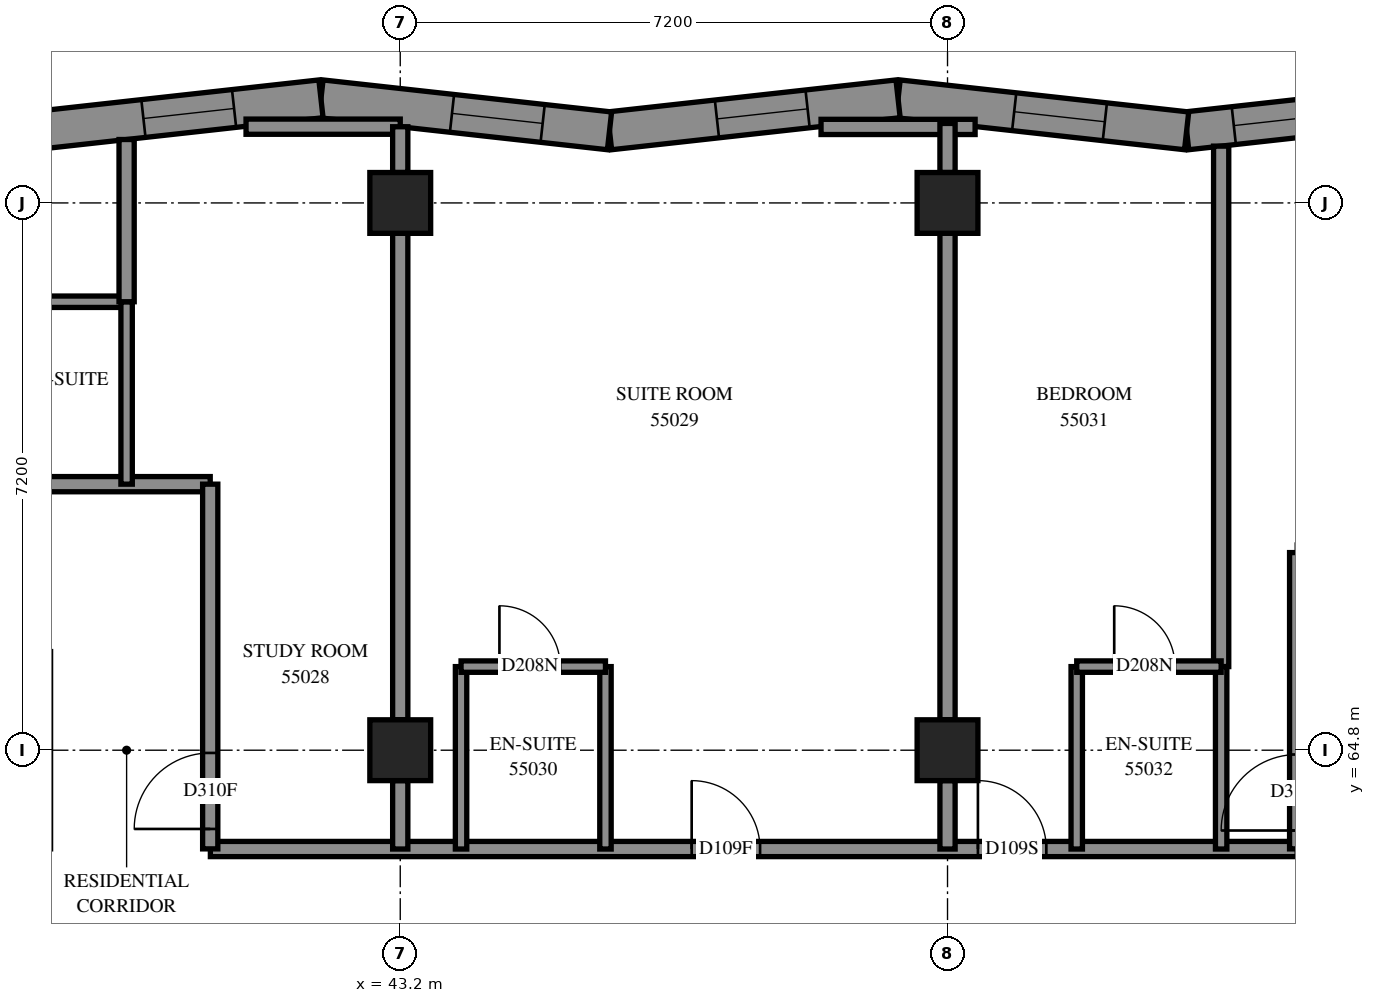
"""IFC4 building model, lengths in metres.
Left out: names, types, materials, properties, quantities, classifications, styles, units other than length and angle.
Written with IfcOpenShell. Run it as: python <this file> out.ifc"""

import sys

from ifc_helpers import new_model, si_unit, direction, frame, frame_2d, origin, origin_2d, place, context, subcontext, project, spatial, polyline, rectangle, outline, extrude, element, fill, save


model = new_model("IFC4")
c1 = context("Model", 3, precision=1e-05, world=origin(), true_north=direction((0.0, 1.0)))
c2 = subcontext(c1, "Body", "Model", "MODEL_VIEW")
j1 = project(units=[si_unit("LENGTHUNIT", "METRE"), si_unit("PLANEANGLEUNIT", "RADIAN")], contexts=[c1])
p1 = place(None, origin())
s1 = spatial("IfcSite", under=j1, at=p1, CompositionType="ELEMENT")
p2 = place(p1, origin())
s2 = spatial("IfcBuilding", under=s1, at=p2, CompositionType="ELEMENT")
p3 = place(p2, frame((0.0, 0.0, 203.2)))
s3 = spatial("IfcBuildingStorey", under=s2, at=p3, CompositionType="ELEMENT", Elevation=203.2)
for number, where, z_axis, x_axis in (
    (1, (43.2, 64.8, 0.0), (0.0, 0.0, 1.0), (1.0, 0.0, 0.0)),
    (2, (43.2, 72.0, 0.0), (0.0, 0.0, 1.0), (1.0, 0.0, 0.0)),
    (3, (50.4, 64.8, 0.0), (0.0, 0.0, 1.0), (1.0, 0.0, 0.0)),
    (4, (50.4, 72.0, 0.0), (0.0, 0.0, 1.0), (1.0, 0.0, 0.0)),
):
    element("IfcColumn", number, at=place(p3, frame(where, z_axis=z_axis, x_axis=x_axis)), inside=s3, PredefinedType="COLUMN", context=c2, shape_type="SweptSolid", body=[
        extrude(rectangle(XDim=0.8, YDim=0.8, at=origin_2d()), origin(), (0.0, 0.0, 1.0), 3.1),
    ])
p4 = place(p3, frame((57.342, 73.37, 0.0), z_axis=(0.0, 0.0, 1.0), x_axis=(-0.99390702, -0.1102217568, 0.0)))
e5 = element("IfcWall", 5, at=p4, inside=s3, PredefinedType="SOLIDWALL", context=c2, shape_type="SweptSolid", body=[
    extrude(outline(polyline([(-0.028, -0.25), (3.792, -0.25), (3.847, 0.25), (0.028, 0.25), (-0.028, -0.25)])), origin(), (0.0, 0.0, 1.0), 3.1),
])
p5 = place(p4, frame((0.395, 0.0, 0.45)))
e6 = element("IfcOpeningElement", 6, at=p5, cuts=e5, PredefinedType="OPENING", context=c2, shape_type="SweptSolid", body=[
    extrude(rectangle(XDim=1.3, YDim=2.5, at=frame_2d((0.65, 1.25))), frame((0.0, 0.26, 0.0), z_axis=(0.0, -1.0, 0.0), x_axis=(1.0, 0.0, 0.0)), (0.0, 0.0, 1.0), 0.52),
])
p6 = place(p4, frame((1.895, 0.0, 0.45)))
e7 = element("IfcOpeningElement", 7, at=p6, cuts=e5, PredefinedType="OPENING", context=c2, shape_type="SweptSolid", body=[
    extrude(rectangle(XDim=1.3, YDim=2.5, at=frame_2d((0.65, 1.25))), frame((0.0, 0.26, 0.0), z_axis=(0.0, -1.0, 0.0), x_axis=(1.0, 0.0, 0.0)), (0.0, 0.0, 1.0), 0.52),
])
p7 = place(p3, frame((53.546, 72.948, 0.0), z_axis=(0.0, 0.0, 1.0), x_axis=(-0.99390702, 0.1102217568, 0.0)))
e8 = element("IfcWall", 8, at=p7, inside=s3, PredefinedType="SOLIDWALL", context=c2, shape_type="SweptSolid", body=[
    extrude(outline(polyline([(0.028, -0.25), (3.847, -0.25), (3.792, 0.25), (-0.028, 0.25), (0.028, -0.25)])), origin(), (0.0, 0.0, 1.0), 3.1),
])
p8 = place(p7, frame((1.083, 0.0, 0.45)))
e9 = element("IfcOpeningElement", 9, at=p8, cuts=e8, PredefinedType="OPENING", context=c2, shape_type="SweptSolid", body=[
    extrude(rectangle(XDim=1.2, YDim=2.5, at=frame_2d((0.6, 1.25))), frame((0.0, 0.26, 0.0), z_axis=(0.0, -1.0, 0.0), x_axis=(1.0, 0.0, 0.0)), (0.0, 0.0, 1.0), 0.52),
])
p9 = place(p3, frame((49.749, 73.37, 0.0), z_axis=(0.0, 0.0, 1.0), x_axis=(-0.99390702, -0.1102217568, 0.0)))
e10 = element("IfcWall", 10, at=p9, inside=s3, PredefinedType="SOLIDWALL", context=c2, shape_type="SweptSolid", body=[
    extrude(outline(polyline([(-0.028, -0.25), (3.792, -0.25), (3.847, 0.25), (0.028, 0.25), (-0.028, -0.25)])), origin(), (0.0, 0.0, 1.0), 3.1),
])
p10 = place(p9, frame((1.198, 0.0, 0.45)))
e11 = element("IfcOpeningElement", 11, at=p10, cuts=e10, PredefinedType="OPENING", context=c2, shape_type="SweptSolid", body=[
    extrude(rectangle(XDim=1.2, YDim=2.5, at=frame_2d((0.6, 1.25))), frame((0.0, 0.26, 0.0), z_axis=(0.0, -1.0, 0.0), x_axis=(1.0, 0.0, 0.0)), (0.0, 0.0, 1.0), 0.52),
])
p11 = place(p3, frame((45.953, 72.948, 0.0), z_axis=(0.0, 0.0, 1.0), x_axis=(-0.99390702, 0.1102217568, 0.0)))
e12 = element("IfcWall", 12, at=p11, inside=s3, PredefinedType="SOLIDWALL", context=c2, shape_type="SweptSolid", body=[
    extrude(outline(polyline([(0.028, -0.25), (3.847, -0.25), (3.792, 0.25), (-0.028, 0.25), (0.028, -0.25)])), origin(), (0.0, 0.0, 1.0), 3.1),
])
p12 = place(p11, frame((0.885, 0.0, 0.45)))
e13 = element("IfcOpeningElement", 13, at=p12, cuts=e12, PredefinedType="OPENING", context=c2, shape_type="SweptSolid", body=[
    extrude(rectangle(XDim=1.2, YDim=2.5, at=frame_2d((0.6, 1.25))), frame((0.0, 0.26, 0.0), z_axis=(0.0, -1.0, 0.0), x_axis=(1.0, 0.0, 0.0)), (0.0, 0.0, 1.0), 0.52),
])
p13 = place(p3, frame((42.157, 73.37, 0.0), z_axis=(0.0, 0.0, 1.0), x_axis=(-0.99390702, -0.1102217568, 0.0)))
e14 = element("IfcWall", 14, at=p13, inside=s3, PredefinedType="SOLIDWALL", context=c2, shape_type="SweptSolid", body=[
    extrude(outline(polyline([(-0.028, -0.25), (3.792, -0.25), (3.847, 0.25), (0.028, 0.25), (-0.028, -0.25)])), origin(), (0.0, 0.0, 1.0), 3.1),
])
p14 = place(p13, frame((1.15, 0.0, 0.45)))
e15 = element("IfcOpeningElement", 15, at=p14, cuts=e14, PredefinedType="OPENING", context=c2, shape_type="SweptSolid", body=[
    extrude(rectangle(XDim=1.2, YDim=2.5, at=frame_2d((0.6, 1.25))), frame((0.0, 0.26, 0.0), z_axis=(0.0, -1.0, 0.0), x_axis=(1.0, 0.0, 0.0)), (0.0, 0.0, 1.0), 0.52),
])
p15 = place(p3, frame((21.6, 68.3, 0.0), z_axis=(0.0, 0.0, 1.0), x_axis=(1.0, 0.0, 0.0)))
e16 = element("IfcWall", 16, at=p15, inside=s3, PredefinedType="PARTITIONING", context=c2, shape_type="SweptSolid", body=[
    extrude(rectangle(XDim=19.1, YDim=0.2, at=frame_2d((9.55, 0.0))), origin(), (0.0, 0.0, 1.0), 3.1),
])
p16 = place(p15, frame((2.3, 0.0, 0.0)))
e17 = element("IfcOpeningElement", 17, at=p16, cuts=e16, PredefinedType="OPENING", context=c2, shape_type="SweptSolid", body=[
    extrude(rectangle(XDim=0.9, YDim=2.1, at=frame_2d((0.45, 1.05))), frame((0.0, 0.11, 0.0), z_axis=(0.0, -1.0, 0.0), x_axis=(1.0, 0.0, 0.0)), (0.0, 0.0, 1.0), 0.22),
])
p17 = place(p15, frame((5.901, 0.0, 0.0)))
e18 = element("IfcOpeningElement", 18, at=p17, cuts=e16, PredefinedType="OPENING", context=c2, shape_type="SweptSolid", body=[
    extrude(rectangle(XDim=0.9, YDim=2.1, at=frame_2d((0.45, 1.05))), frame((0.0, 0.11, 0.0), z_axis=(0.0, -1.0, 0.0), x_axis=(1.0, 0.0, 0.0)), (0.0, 0.0, 1.0), 0.22),
])
p18 = place(p15, frame((13.139, 0.0, 0.0)))
e19 = element("IfcOpeningElement", 19, at=p18, cuts=e16, PredefinedType="OPENING", context=c2, shape_type="SweptSolid", body=[
    extrude(rectangle(XDim=0.9, YDim=2.1, at=frame_2d((0.45, 1.05))), frame((0.0, 0.11, 0.0), z_axis=(0.0, -1.0, 0.0), x_axis=(1.0, 0.0, 0.0)), (0.0, 0.0, 1.0), 0.22),
])
p19 = place(p3, frame((40.702, 63.5, 0.0), z_axis=(0.0, 0.0, 1.0), x_axis=(1.0, 0.0, 0.0)))
e20 = element("IfcWall", 20, at=p19, inside=s3, PredefinedType="PARTITIONING", context=c2, shape_type="SweptSolid", body=[
    extrude(rectangle(XDim=14.298, YDim=0.2, at=frame_2d((7.149, 0.0))), origin(), (0.0, 0.0, 1.0), 3.1),
])
p20 = place(p19, frame((6.332, 0.0, 0.0)))
e21 = element("IfcOpeningElement", 21, at=p20, cuts=e20, PredefinedType="OPENING", context=c2, shape_type="SweptSolid", body=[
    extrude(rectangle(XDim=0.9, YDim=2.1, at=frame_2d((0.45, 1.05))), frame((0.0, 0.11, 0.0), z_axis=(0.0, -1.0, 0.0), x_axis=(1.0, 0.0, 0.0)), (0.0, 0.0, 1.0), 0.22),
])
p21 = place(p19, frame((10.098, 0.0, 0.0)))
e22 = element("IfcOpeningElement", 22, at=p21, cuts=e20, PredefinedType="OPENING", context=c2, shape_type="SweptSolid", body=[
    extrude(rectangle(XDim=0.9, YDim=2.1, at=frame_2d((0.45, 1.05))), frame((0.0, 0.11, 0.0), z_axis=(0.0, -1.0, 0.0), x_axis=(1.0, 0.0, 0.0)), (0.0, 0.0, 1.0), 0.22),
])
p22 = place(p3, frame((54.0, 65.9, 0.0), z_axis=(0.0, 0.0, 1.0), x_axis=(0.0, 1.0, 0.0)))
e23 = element("IfcWall", 23, at=p22, inside=s3, PredefinedType="PARTITIONING", context=c2, shape_type="SweptSolid", body=[
    extrude(rectangle(XDim=6.847, YDim=0.2, at=frame_2d((3.424, 0.0))), origin(), (0.0, 0.0, 1.0), 3.1),
])
for number, where, z_axis, x_axis in (
    (24, (43.2, 65.2, 0.0), (0.0, 0.0, 1.0), (0.0, 1.0, 0.0)),
    (25, (50.4, 65.2, 0.0), (0.0, 0.0, 1.0), (0.0, 1.0, 0.0)),
):
    element("IfcWall", number, at=place(p3, frame(where, z_axis=z_axis, x_axis=x_axis)), inside=s3, PredefinedType="PARTITIONING", context=c2, shape_type="SweptSolid", body=[
        extrude(rectangle(XDim=6.4, YDim=0.2, at=frame_2d((3.2, 0.0))), origin(), (0.0, 0.0, 1.0), 3.1),
    ])
p23 = place(p3, frame((40.7, 63.502, 0.0), z_axis=(0.0, 0.0, 1.0), x_axis=(0.0, 1.0, 0.0)))
e26 = element("IfcWall", 26, at=p23, inside=s3, PredefinedType="PARTITIONING", context=c2, shape_type="SweptSolid", body=[
    extrude(rectangle(XDim=4.798, YDim=0.2, at=frame_2d((2.399, 0.0))), origin(), (0.0, 0.0, 1.0), 3.1),
])
p24 = place(p23, frame((0.262, 0.0, 0.0)))
e27 = element("IfcOpeningElement", 27, at=p24, cuts=e26, PredefinedType="OPENING", context=c2, shape_type="SweptSolid", body=[
    extrude(rectangle(XDim=1.0, YDim=2.1, at=frame_2d((0.5, 1.05))), frame((0.0, 0.11, 0.0), z_axis=(0.0, -1.0, 0.0), x_axis=(1.0, 0.0, 0.0)), (0.0, 0.0, 1.0), 0.22),
])
p25 = place(p3, frame((55.0, 63.502, 0.0), z_axis=(0.0, 0.0, 1.0), x_axis=(0.0, 1.0, 0.0)))
e28 = element("IfcWall", 28, at=p25, inside=s3, PredefinedType="PARTITIONING", context=c2, shape_type="SweptSolid", body=[
    extrude(rectangle(XDim=3.898, YDim=0.2, at=frame_2d((1.949, 0.0))), origin(), (0.0, 0.0, 1.0), 3.1),
])
p26 = place(p25, frame((0.242, 0.0, 0.0)))
e29 = element("IfcOpeningElement", 29, at=p26, cuts=e28, PredefinedType="OPENING", context=c2, shape_type="SweptSolid", body=[
    extrude(rectangle(XDim=1.0, YDim=2.1, at=frame_2d((0.5, 1.05))), frame((0.0, 0.11, 0.0), z_axis=(0.0, -1.0, 0.0), x_axis=(1.0, 0.0, 0.0)), (0.0, 0.0, 1.0), 0.22),
])
p27 = place(p3, frame((36.4, 70.7, 0.0), z_axis=(0.0, 0.0, 1.0), x_axis=(1.0, 0.0, 0.0)))
e30 = element("IfcWall", 30, at=p27, inside=s3, PredefinedType="PARTITIONING", context=c2, shape_type="SweptSolid", body=[
    extrude(rectangle(XDim=3.2, YDim=0.15, at=frame_2d((1.6, 0.0))), origin(), (0.0, 0.0, 1.0), 3.1),
])
p28 = place(p27, frame((1.204, 0.0, 0.0)))
e31 = element("IfcOpeningElement", 31, at=p28, cuts=e30, PredefinedType="OPENING", context=c2, shape_type="SweptSolid", body=[
    extrude(rectangle(XDim=0.8, YDim=2.1, at=frame_2d((0.4, 1.05))), frame((0.0, 0.085, 0.0), z_axis=(0.0, -1.0, 0.0), x_axis=(1.0, 0.0, 0.0)), (0.0, 0.0, 1.0), 0.17),
])
for number, where, z_axis, x_axis in (
    (32, (39.6, 68.3, 0.0), (0.0, 0.0, 1.0), (0.0, 1.0, 0.0)),
    (33, (44.0, 63.5, 0.0), (0.0, 0.0, 1.0), (0.0, 1.0, 0.0)),
    (34, (45.9, 63.5, 0.0), (0.0, 0.0, 1.0), (0.0, 1.0, 0.0)),
    (35, (52.1, 63.5, 0.0), (0.0, 0.0, 1.0), (0.0, 1.0, 0.0)),
    (36, (54.0, 63.5, 0.0), (0.0, 0.0, 1.0), (0.0, 1.0, 0.0)),
):
    element("IfcWall", number, at=place(p3, frame(where, z_axis=z_axis, x_axis=x_axis)), inside=s3, PredefinedType="PARTITIONING", context=c2, shape_type="SweptSolid", body=[
        extrude(rectangle(XDim=2.4, YDim=0.15, at=frame_2d((1.2, 0.0))), origin(), (0.0, 0.0, 1.0), 3.1),
    ])
p29 = place(p3, frame((39.6, 70.7, 0.0), z_axis=(0.0, 0.0, 1.0), x_axis=(0.0, 1.0, 0.0)))
e37 = element("IfcWall", 37, at=p29, inside=s3, PredefinedType="PARTITIONING", context=c2, shape_type="SweptSolid", body=[
    extrude(rectangle(XDim=2.134, YDim=0.2, at=frame_2d((1.067, 0.0))), origin(), (0.0, 0.0, 1.0), 3.1),
])
p30 = place(p3, frame((48.736, 73.0, 0.0), z_axis=(0.0, 0.0, 1.0), x_axis=(1.0, 0.0, 0.0)))
e38 = element("IfcWall", 38, at=p30, inside=s3, PredefinedType="PARTITIONING", context=c2, shape_type="SweptSolid", body=[
    extrude(rectangle(XDim=2.027, YDim=0.2, at=frame_2d((1.014, 0.0))), origin(), (0.0, 0.0, 1.0), 3.1),
])
p31 = place(p3, frame((41.171, 73.003, 0.0), z_axis=(0.0, 0.0, 1.0), x_axis=(1.0, 0.0, 0.0)))
e39 = element("IfcWall", 39, at=p31, inside=s3, PredefinedType="PARTITIONING", context=c2, shape_type="SweptSolid", body=[
    extrude(rectangle(XDim=2.029, YDim=0.2, at=frame_2d((1.014, 0.0))), origin(), (0.0, 0.0, 1.0), 3.1),
])
p32 = place(p3, frame((44.0, 65.9, 0.0), z_axis=(0.0, 0.0, 1.0), x_axis=(1.0, 0.0, 0.0)))
e40 = element("IfcWall", 40, at=p32, inside=s3, PredefinedType="PARTITIONING", context=c2, shape_type="SweptSolid", body=[
    extrude(rectangle(XDim=1.9, YDim=0.15, at=frame_2d((0.95, 0.0))), origin(), (0.0, 0.0, 1.0), 3.1),
])
p33 = place(p32, frame((0.505, 0.0, 0.0)))
e41 = element("IfcOpeningElement", 41, at=p33, cuts=e40, PredefinedType="OPENING", context=c2, shape_type="SweptSolid", body=[
    extrude(rectangle(XDim=0.8, YDim=2.1, at=frame_2d((0.4, 1.05))), frame((0.0, 0.085, 0.0), z_axis=(0.0, -1.0, 0.0), x_axis=(1.0, 0.0, 0.0)), (0.0, 0.0, 1.0), 0.17),
])
p34 = place(p3, frame((52.1, 65.9, 0.0), z_axis=(0.0, 0.0, 1.0), x_axis=(1.0, 0.0, 0.0)))
e42 = element("IfcWall", 42, at=p34, inside=s3, PredefinedType="PARTITIONING", context=c2, shape_type="SweptSolid", body=[
    extrude(rectangle(XDim=1.9, YDim=0.15, at=frame_2d((0.95, 0.0))), origin(), (0.0, 0.0, 1.0), 3.1),
])
p35 = place(p34, frame((0.493, 0.0, 0.0)))
e43 = element("IfcOpeningElement", 43, at=p35, cuts=e42, PredefinedType="OPENING", context=c2, shape_type="SweptSolid", body=[
    extrude(rectangle(XDim=0.8, YDim=2.1, at=frame_2d((0.4, 1.05))), frame((0.0, 0.085, 0.0), z_axis=(0.0, -1.0, 0.0), x_axis=(1.0, 0.0, 0.0)), (0.0, 0.0, 1.0), 0.17),
])
for number, where, z_axis, x_axis in (
    (44, (43.2, 63.5, 0.0), (0.0, 0.0, 1.0), (0.0, 1.0, 0.0)),
    (45, (50.4, 63.5, 0.0), (0.0, 0.0, 1.0), (0.0, 1.0, 0.0)),
):
    element("IfcWall", number, at=place(p3, frame(where, z_axis=z_axis, x_axis=x_axis)), inside=s3, PredefinedType="PARTITIONING", context=c2, shape_type="SweptSolid", body=[
        extrude(rectangle(XDim=0.9, YDim=0.2, at=frame_2d((0.45, 0.0))), origin(), (0.0, 0.0, 1.0), 3.1),
    ])
p36 = place(p3, frame((50.4, 72.4, 0.0), z_axis=(0.0, 0.0, 1.0), x_axis=(0.0, 1.0, 0.0)))
e46 = element("IfcWall", 46, at=p36, inside=s3, PredefinedType="PARTITIONING", context=c2, shape_type="SweptSolid", body=[
    extrude(rectangle(XDim=0.646, YDim=0.2, at=frame_2d((0.323, 0.0))), origin(), (0.0, 0.0, 1.0), 3.1),
])
p37 = place(p3, frame((43.2, 72.4, 0.0), z_axis=(0.0, 0.0, 1.0), x_axis=(0.0, 1.0, 0.0)))
e47 = element("IfcWall", 47, at=p37, inside=s3, PredefinedType="PARTITIONING", context=c2, shape_type="SweptSolid", body=[
    extrude(rectangle(XDim=0.602, YDim=0.2, at=frame_2d((0.301, 0.0))), origin(), (0.0, 0.0, 1.0), 3.1),
])
p38 = place(p6, origin())
e48 = element("IfcWindow", 48, at=p38, inside=s3, PartitioningType="SINGLE_PANEL", PredefinedType="WINDOW", context=c2, shape_type="SweptSolid", body=[
    extrude(rectangle(XDim=1.3, YDim=2.5, at=frame_2d((0.65, 1.25))), frame((0.0, 0.18, 0.0), z_axis=(0.0, -1.0, 0.0), x_axis=(1.0, 0.0, 0.0)), (0.0, 0.0, 1.0), 0.06),
])
fill(e7, e48)
p39 = place(p8, origin())
e49 = element("IfcWindow", 49, at=p39, inside=s3, PartitioningType="SINGLE_PANEL", PredefinedType="WINDOW", context=c2, shape_type="SweptSolid", body=[
    extrude(rectangle(XDim=1.2, YDim=2.5, at=frame_2d((0.6, 1.25))), frame((0.0, 0.18, 0.0), z_axis=(0.0, -1.0, 0.0), x_axis=(1.0, 0.0, 0.0)), (0.0, 0.0, 1.0), 0.06),
])
fill(e9, e49)
p40 = place(p10, origin())
e50 = element("IfcWindow", 50, at=p40, inside=s3, PartitioningType="SINGLE_PANEL", PredefinedType="WINDOW", context=c2, shape_type="SweptSolid", body=[
    extrude(rectangle(XDim=1.2, YDim=2.5, at=frame_2d((0.6, 1.25))), frame((0.0, 0.18, 0.0), z_axis=(0.0, -1.0, 0.0), x_axis=(1.0, 0.0, 0.0)), (0.0, 0.0, 1.0), 0.06),
])
fill(e11, e50)
p41 = place(p12, origin())
e51 = element("IfcWindow", 51, at=p41, inside=s3, PartitioningType="SINGLE_PANEL", PredefinedType="WINDOW", context=c2, shape_type="SweptSolid", body=[
    extrude(rectangle(XDim=1.2, YDim=2.5, at=frame_2d((0.6, 1.25))), frame((0.0, 0.18, 0.0), z_axis=(0.0, -1.0, 0.0), x_axis=(1.0, 0.0, 0.0)), (0.0, 0.0, 1.0), 0.06),
])
fill(e13, e51)
p42 = place(p14, origin())
e52 = element("IfcWindow", 52, at=p42, inside=s3, PartitioningType="SINGLE_PANEL", PredefinedType="WINDOW", context=c2, shape_type="SweptSolid", body=[
    extrude(rectangle(XDim=1.2, YDim=2.5, at=frame_2d((0.6, 1.25))), frame((0.0, 0.18, 0.0), z_axis=(0.0, -1.0, 0.0), x_axis=(1.0, 0.0, 0.0)), (0.0, 0.0, 1.0), 0.06),
])
fill(e15, e52)
p43 = place(p24, origin())
e53 = element("IfcDoor", 53, at=p43, inside=s3, OperationType="SINGLE_SWING_LEFT", PredefinedType="DOOR", context=c2, shape_type="SweptSolid", body=[
    extrude(rectangle(XDim=1.0, YDim=2.1, at=frame_2d((0.5, 1.05))), frame((0.0, 0.025, 0.0), z_axis=(0.0, -1.0, 0.0), x_axis=(1.0, 0.0, 0.0)), (0.0, 0.0, 1.0), 0.05),
])
fill(e27, e53)
p44 = place(p20, origin())
e54 = element("IfcDoor", 54, at=p44, inside=s3, OperationType="SINGLE_SWING_RIGHT", PredefinedType="DOOR", context=c2, shape_type="SweptSolid", body=[
    extrude(rectangle(XDim=0.9, YDim=2.1, at=frame_2d((0.45, 1.05))), frame((0.0, 0.025, 0.0), z_axis=(0.0, -1.0, 0.0), x_axis=(1.0, 0.0, 0.0)), (0.0, 0.0, 1.0), 0.05),
])
fill(e21, e54)
p45 = place(p33, origin())
e55 = element("IfcDoor", 55, at=p45, inside=s3, OperationType="SINGLE_SWING_RIGHT", PredefinedType="DOOR", context=c2, shape_type="SweptSolid", body=[
    extrude(rectangle(XDim=0.8, YDim=2.1, at=frame_2d((0.4, 1.05))), frame((0.0, 0.025, 0.0), z_axis=(0.0, -1.0, 0.0), x_axis=(1.0, 0.0, 0.0)), (0.0, 0.0, 1.0), 0.05),
])
fill(e41, e55)
p46 = place(p21, origin())
e56 = element("IfcDoor", 56, at=p46, inside=s3, OperationType="SINGLE_SWING_RIGHT", PredefinedType="DOOR", context=c2, shape_type="SweptSolid", body=[
    extrude(rectangle(XDim=0.9, YDim=2.1, at=frame_2d((0.45, 1.05))), frame((0.0, 0.025, 0.0), z_axis=(0.0, -1.0, 0.0), x_axis=(1.0, 0.0, 0.0)), (0.0, 0.0, 1.0), 0.05),
])
fill(e22, e56)
p47 = place(p35, origin())
e57 = element("IfcDoor", 57, at=p47, inside=s3, OperationType="SINGLE_SWING_RIGHT", PredefinedType="DOOR", context=c2, shape_type="SweptSolid", body=[
    extrude(rectangle(XDim=0.8, YDim=2.1, at=frame_2d((0.4, 1.05))), frame((0.0, 0.025, 0.0), z_axis=(0.0, -1.0, 0.0), x_axis=(1.0, 0.0, 0.0)), (0.0, 0.0, 1.0), 0.05),
])
fill(e43, e57)
p48 = place(p26, origin())
e58 = element("IfcDoor", 58, at=p48, inside=s3, OperationType="SINGLE_SWING_LEFT", PredefinedType="DOOR", context=c2, shape_type="SweptSolid", body=[
    extrude(rectangle(XDim=1.0, YDim=2.1, at=frame_2d((0.5, 1.05))), frame((0.0, 0.025, 0.0), z_axis=(0.0, -1.0, 0.0), x_axis=(1.0, 0.0, 0.0)), (0.0, 0.0, 1.0), 0.05),
])
fill(e29, e58)
save(model, sys.argv[1])
